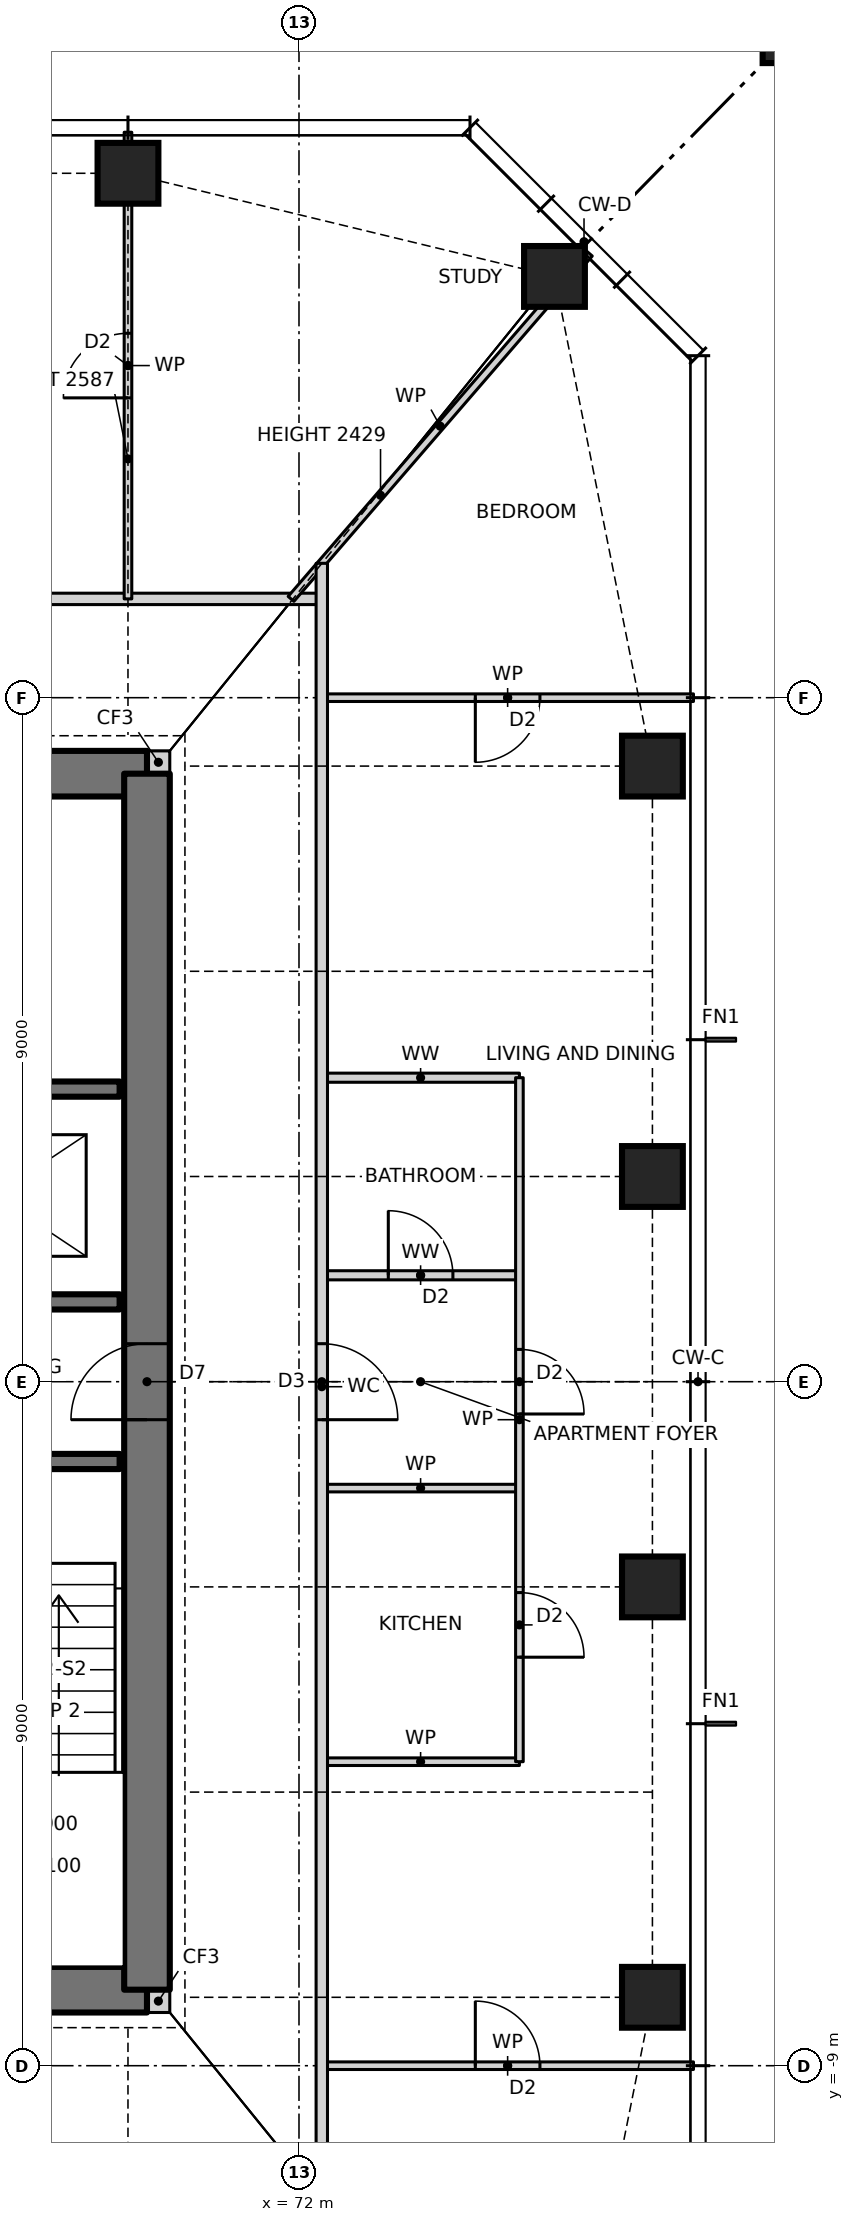
"""IFC4 building model, lengths in metres.
Left out: names, types, materials, properties, quantities, classifications, styles, units other than length and angle.
Written with IfcOpenShell. Run it as: python <this file> out.ifc"""

import sys

from ifc_helpers import new_model, si_unit, direction, frame, frame_2d, origin, origin_2d, place, context, subcontext, project, spatial, rectangle, hollow_rectangle, extrude, element, fill, save


model = new_model("IFC4")
c1 = context("Model", 3, precision=1e-05, world=origin(), true_north=direction((0.0, 1.0)))
c2 = subcontext(c1, "Body", "Model", "MODEL_VIEW")
j1 = project(units=[si_unit("LENGTHUNIT", "METRE"), si_unit("PLANEANGLEUNIT", "RADIAN")], contexts=[c1])
p1 = place(None, origin())
s1 = spatial("IfcSite", under=j1, at=p1, CompositionType="ELEMENT")
p2 = place(p1, origin())
s2 = spatial("IfcBuilding", under=s1, at=p2, CompositionType="ELEMENT")
p3 = place(p2, frame((0.0, 0.0, 122.5)))
s3 = spatial("IfcBuildingStorey", under=s2, at=p3, CompositionType="ELEMENT", Elevation=122.5)
for number, where, z_axis, x_axis in (
    (1, (76.65, -8.1, 0.0), (0.0, 0.0, 1.0), (1.0, 0.0, 0.0)),
    (2, (76.65, -2.7, 0.0), (0.0, 0.0, 1.0), (1.0, 0.0, 0.0)),
    (3, (76.65, 2.7, 0.0), (0.0, 0.0, 1.0), (1.0, 0.0, 0.0)),
    (4, (76.65, 8.1, 0.0), (0.0, 0.0, 1.0), (1.0, 0.0, 0.0)),
    (5, (75.361, 14.543, 0.0), (0.0, 0.0, 1.0), (1.0, 0.0, 0.0)),
    (6, (69.75, 15.9, 0.0), (0.0, 0.0, 1.0), (1.0, 0.0, 0.0)),
):
    element("IfcColumn", number, at=place(p3, frame(where, z_axis=z_axis, x_axis=x_axis)), inside=s3, PredefinedType="COLUMN", context=c2, shape_type="SweptSolid", body=[
        extrude(hollow_rectangle(XDim=0.8, YDim=0.8, WallThickness=0.1, at=origin_2d()), origin(), (0.0, 0.0, 1.0), 3.5),
    ])
p4 = place(p3, frame((78.65, 17.9, 0.0), z_axis=(0.0, 0.0, 1.0), x_axis=(1.0, 0.0, 0.0)))
e7 = element("IfcColumn", 7, at=p4, inside=s3, PredefinedType="COLUMN", context=c2, shape_type="SweptSolid", body=[
    extrude(hollow_rectangle(XDim=1.1, YDim=1.1, WallThickness=0.06, at=origin_2d()), origin(), (0.0, 0.0, 1.0), 3.5),
])
for number, where, z_axis, x_axis in (
    (8, (70.0, -8.15, 0.0), (0.0, 0.0, 1.0), (1.0, 0.0, 0.0)),
    (9, (70.0, 8.15, 0.0), (0.0, 0.0, 1.0), (1.0, 0.0, 0.0)),
):
    element("IfcWall", number, at=place(p3, frame(where, z_axis=z_axis, x_axis=x_axis)), inside=s3, PredefinedType="SOLIDWALL", context=c2, shape_type="SweptSolid", body=[
        extrude(rectangle(XDim=0.3, YDim=0.3, at=frame_2d((0.15, 0.0))), origin(), (0.0, 0.0, 1.0), 3.5),
    ])
p5 = place(p3, frame((56.0, -8.0, 0.0), z_axis=(0.0, 0.0, 1.0), x_axis=(1.0, 0.0, 0.0)))
e10 = element("IfcWall", 10, at=p5, inside=s3, PredefinedType="SHEAR", context=c2, shape_type="SweptSolid", body=[
    extrude(rectangle(XDim=14.0, YDim=0.6, at=frame_2d((7.0, 0.0))), origin(), (0.0, 0.0, 1.0), 3.5),
])
p6 = place(p5, frame((2.7, 0.0, 0.0)))
e11 = element("IfcOpeningElement", 11, at=p6, cuts=e10, PredefinedType="OPENING", context=c2, shape_type="SweptSolid", body=[
    extrude(rectangle(XDim=0.9, YDim=2.1, at=frame_2d((0.45, 1.05))), frame((0.0, 0.31, 0.0), z_axis=(0.0, -1.0, 0.0), x_axis=(1.0, 0.0, 0.0)), (0.0, 0.0, 1.0), 0.62),
])
p7 = place(p5, frame((7.7, 0.0, 0.0)))
e12 = element("IfcOpeningElement", 12, at=p7, cuts=e10, PredefinedType="OPENING", context=c2, shape_type="SweptSolid", body=[
    extrude(rectangle(XDim=0.9, YDim=2.1, at=frame_2d((0.45, 1.05))), frame((0.0, 0.31, 0.0), z_axis=(0.0, -1.0, 0.0), x_axis=(1.0, 0.0, 0.0)), (0.0, 0.0, 1.0), 0.62),
])
p8 = place(p3, frame((70.0, 8.0, 0.0), z_axis=(0.0, 0.0, 1.0), x_axis=(-1.0, 0.0, 0.0)))
e13 = element("IfcWall", 13, at=p8, inside=s3, PredefinedType="SHEAR", context=c2, shape_type="SweptSolid", body=[
    extrude(rectangle(XDim=14.0, YDim=0.6, at=frame_2d((7.0, 0.0))), origin(), (0.0, 0.0, 1.0), 3.5),
])
p9 = place(p8, frame((8.2, 0.0, 0.0)))
e14 = element("IfcOpeningElement", 14, at=p9, cuts=e13, PredefinedType="OPENING", context=c2, shape_type="SweptSolid", body=[
    extrude(rectangle(XDim=0.9, YDim=2.1, at=frame_2d((0.45, 1.05))), frame((0.0, 0.31, 0.0), z_axis=(0.0, -1.0, 0.0), x_axis=(1.0, 0.0, 0.0)), (0.0, 0.0, 1.0), 0.62),
])
p10 = place(p8, frame((3.2, 0.0, 0.0)))
e15 = element("IfcOpeningElement", 15, at=p10, cuts=e13, PredefinedType="OPENING", context=c2, shape_type="SweptSolid", body=[
    extrude(rectangle(XDim=0.9, YDim=2.1, at=frame_2d((0.45, 1.05))), frame((0.0, 0.31, 0.0), z_axis=(0.0, -1.0, 0.0), x_axis=(1.0, 0.0, 0.0)), (0.0, 0.0, 1.0), 0.62),
])
p11 = place(p3, frame((70.0, -8.0, 0.0), z_axis=(0.0, 0.0, 1.0), x_axis=(0.0, 1.0, 0.0)))
e16 = element("IfcWall", 16, at=p11, inside=s3, PredefinedType="SHEAR", context=c2, shape_type="SweptSolid", body=[
    extrude(rectangle(XDim=16.0, YDim=0.6, at=frame_2d((8.0, 0.0))), origin(), (0.0, 0.0, 1.0), 3.5),
])
p12 = place(p11, frame((7.5, 0.0, 0.0)))
e17 = element("IfcOpeningElement", 17, at=p12, cuts=e16, PredefinedType="OPENING", context=c2, shape_type="SweptSolid", body=[
    extrude(rectangle(XDim=1.0, YDim=2.1, at=frame_2d((0.5, 1.05))), frame((0.0, 0.31, 0.0), z_axis=(0.0, -1.0, 0.0), x_axis=(1.0, 0.0, 0.0)), (0.0, 0.0, 1.0), 0.62),
])
p13 = place(p3, frame((72.3, -9.0, 0.0), z_axis=(0.0, 0.0, 1.0), x_axis=(1.0, 0.0, 0.0)))
e18 = element("IfcWall", 18, at=p13, inside=s3, PredefinedType="PARTITIONING", context=c2, shape_type="SweptSolid", body=[
    extrude(rectangle(XDim=4.89, YDim=0.1, at=frame_2d((2.445, 0.0))), origin(), (0.0, 0.0, 1.0), 3.27),
])
p14 = place(p13, frame((2.02, 0.0, 0.0)))
e19 = element("IfcOpeningElement", 19, at=p14, cuts=e18, PredefinedType="OPENING", context=c2, shape_type="SweptSolid", body=[
    extrude(rectangle(XDim=0.85, YDim=2.1, at=frame_2d((0.425, 1.05))), frame((0.0, 0.06, 0.0), z_axis=(0.0, -1.0, 0.0), x_axis=(1.0, 0.0, 0.0)), (0.0, 0.0, 1.0), 0.12),
])
for number, where, z_axis, x_axis in (
    (20, (72.3, -5.0, 0.0), (0.0, 0.0, 1.0), (1.0, 0.0, 0.0)),
    (21, (72.3, -1.4, 0.0), (0.0, 0.0, 1.0), (1.0, 0.0, 0.0)),
):
    element("IfcWall", number, at=place(p3, frame(where, z_axis=z_axis, x_axis=x_axis)), inside=s3, PredefinedType="PARTITIONING", context=c2, shape_type="SweptSolid", body=[
        extrude(rectangle(XDim=2.6, YDim=0.1, at=frame_2d((1.3, 0.0))), origin(), (0.0, 0.0, 1.0), 3.27),
    ])
p15 = place(p3, frame((56.36, -1.05, 0.0), z_axis=(0.0, 0.0, 1.0), x_axis=(1.0, 0.0, 0.0)))
e22 = element("IfcWall", 22, at=p15, inside=s3, PredefinedType="SOLIDWALL", context=c2, shape_type="SweptSolid", body=[
    extrude(rectangle(XDim=13.28, YDim=0.2, at=frame_2d((6.64, 0.0))), origin(), (0.0, 0.0, 1.0), 3.5),
])
p16 = place(p15, frame((11.11, 0.0, 0.0)))
e23 = element("IfcOpeningElement", 23, at=p16, cuts=e22, PredefinedType="OPENING", context=c2, shape_type="SweptSolid", body=[
    extrude(rectangle(XDim=1.0, YDim=2.1, at=frame_2d((0.5, 1.05))), frame((0.0, 0.11, 0.0), z_axis=(0.0, -1.0, 0.0), x_axis=(1.0, 0.0, 0.0)), (0.0, 0.0, 1.0), 0.22),
])
p17 = place(p15, frame((1.087, 0.0, 0.0)))
e24 = element("IfcOpeningElement", 24, at=p17, cuts=e22, PredefinedType="OPENING", context=c2, shape_type="SweptSolid", body=[
    extrude(rectangle(XDim=1.1, YDim=2.1, at=frame_2d((0.55, 1.05))), frame((0.0, 0.11, 0.0), z_axis=(0.0, -1.0, 0.0), x_axis=(1.0, 0.0, 0.0)), (0.0, 0.0, 1.0), 0.22),
])
p18 = place(p15, frame((4.39, 0.0, 0.0)))
e25 = element("IfcOpeningElement", 25, at=p18, cuts=e22, PredefinedType="OPENING", context=c2, shape_type="SweptSolid", body=[
    extrude(rectangle(XDim=1.1, YDim=2.1, at=frame_2d((0.55, 1.05))), frame((0.0, 0.11, 0.0), z_axis=(0.0, -1.0, 0.0), x_axis=(1.0, 0.0, 0.0)), (0.0, 0.0, 1.0), 0.22),
])
p19 = place(p15, frame((7.724, 0.0, 0.0)))
e26 = element("IfcOpeningElement", 26, at=p19, cuts=e22, PredefinedType="OPENING", context=c2, shape_type="SweptSolid", body=[
    extrude(rectangle(XDim=1.1, YDim=2.1, at=frame_2d((0.55, 1.05))), frame((0.0, 0.11, 0.0), z_axis=(0.0, -1.0, 0.0), x_axis=(1.0, 0.0, 0.0)), (0.0, 0.0, 1.0), 0.22),
])
p20 = place(p3, frame((56.36, 1.05, 0.0), z_axis=(0.0, 0.0, 1.0), x_axis=(1.0, 0.0, 0.0)))
e27 = element("IfcWall", 27, at=p20, inside=s3, PredefinedType="SOLIDWALL", context=c2, shape_type="SweptSolid", body=[
    extrude(rectangle(XDim=13.28, YDim=0.2, at=frame_2d((6.64, 0.0))), origin(), (0.0, 0.0, 1.0), 3.5),
])
p21 = place(p20, frame((1.17, 0.0, 0.0)))
e28 = element("IfcOpeningElement", 28, at=p21, cuts=e27, PredefinedType="OPENING", context=c2, shape_type="SweptSolid", body=[
    extrude(rectangle(XDim=1.0, YDim=2.1, at=frame_2d((0.5, 1.05))), frame((0.0, 0.11, 0.0), z_axis=(0.0, -1.0, 0.0), x_axis=(1.0, 0.0, 0.0)), (0.0, 0.0, 1.0), 0.22),
])
p22 = place(p20, frame((5.14, 0.0, 0.0)))
e29 = element("IfcOpeningElement", 29, at=p22, cuts=e27, PredefinedType="OPENING", context=c2, shape_type="SweptSolid", body=[
    extrude(rectangle(XDim=0.9, YDim=2.1, at=frame_2d((0.45, 1.05))), frame((0.0, 0.11, 0.0), z_axis=(0.0, -1.0, 0.0), x_axis=(1.0, 0.0, 0.0)), (0.0, 0.0, 1.0), 0.22),
])
p23 = place(p20, frame((8.44, 0.0, 0.0)))
e30 = element("IfcOpeningElement", 30, at=p23, cuts=e27, PredefinedType="OPENING", context=c2, shape_type="SweptSolid", body=[
    extrude(rectangle(XDim=0.9, YDim=2.1, at=frame_2d((0.45, 1.05))), frame((0.0, 0.11, 0.0), z_axis=(0.0, -1.0, 0.0), x_axis=(1.0, 0.0, 0.0)), (0.0, 0.0, 1.0), 0.22),
])
p24 = place(p20, frame((10.96, 0.0, 0.0)))
e31 = element("IfcOpeningElement", 31, at=p24, cuts=e27, PredefinedType="OPENING", context=c2, shape_type="SweptSolid", body=[
    extrude(rectangle(XDim=1.3, YDim=2.1, at=frame_2d((0.65, 1.05))), frame((0.0, 0.11, 0.0), z_axis=(0.0, -1.0, 0.0), x_axis=(1.0, 0.0, 0.0)), (0.0, 0.0, 1.0), 0.22),
])
p25 = place(p3, frame((72.3, 1.4, 0.0), z_axis=(0.0, 0.0, 1.0), x_axis=(1.0, 0.0, 0.0)))
e32 = element("IfcWall", 32, at=p25, inside=s3, PredefinedType="PARTITIONING", context=c2, shape_type="SweptSolid", body=[
    extrude(rectangle(XDim=2.6, YDim=0.12, at=frame_2d((1.3, 0.0))), origin(), (0.0, 0.0, 1.0), 3.27),
])
p26 = place(p25, frame((0.875, 0.0, 0.0)))
e33 = element("IfcOpeningElement", 33, at=p26, cuts=e32, PredefinedType="OPENING", context=c2, shape_type="SweptSolid", body=[
    extrude(rectangle(XDim=0.85, YDim=2.1, at=frame_2d((0.425, 1.05))), frame((0.0, 0.07, 0.0), z_axis=(0.0, -1.0, 0.0), x_axis=(1.0, 0.0, 0.0)), (0.0, 0.0, 1.0), 0.14),
])
p27 = place(p3, frame((59.7, 3.85, 0.0), z_axis=(0.0, 0.0, 1.0), x_axis=(1.0, 0.0, 0.0)))
e34 = element("IfcWall", 34, at=p27, inside=s3, PredefinedType="SOLIDWALL", context=c2, shape_type="SweptSolid", body=[
    extrude(rectangle(XDim=9.94, YDim=0.2, at=frame_2d((4.97, 0.0))), origin(), (0.0, 0.0, 1.0), 3.5),
])
p28 = place(p3, frame((72.3, 4.0, 0.0), z_axis=(0.0, 0.0, 1.0), x_axis=(1.0, 0.0, 0.0)))
e35 = element("IfcWall", 35, at=p28, inside=s3, PredefinedType="PARTITIONING", context=c2, shape_type="SweptSolid", body=[
    extrude(rectangle(XDim=2.6, YDim=0.12, at=frame_2d((1.3, 0.0))), origin(), (0.0, 0.0, 1.0), 3.27),
])
p29 = place(p3, frame((72.3, 9.0, 0.0), z_axis=(0.0, 0.0, 1.0), x_axis=(1.0, 0.0, 0.0)))
e36 = element("IfcWall", 36, at=p29, inside=s3, PredefinedType="PARTITIONING", context=c2, shape_type="SweptSolid", body=[
    extrude(rectangle(XDim=4.89, YDim=0.1, at=frame_2d((2.445, 0.0))), origin(), (0.0, 0.0, 1.0), 3.27),
])
p30 = place(p29, frame((2.02, 0.0, 0.0)))
e37 = element("IfcOpeningElement", 37, at=p30, cuts=e36, PredefinedType="OPENING", context=c2, shape_type="SweptSolid", body=[
    extrude(rectangle(XDim=0.85, YDim=2.1, at=frame_2d((0.425, 1.05))), frame((0.0, 0.06, 0.0), z_axis=(0.0, -1.0, 0.0), x_axis=(1.0, 0.0, 0.0)), (0.0, 0.0, 1.0), 0.12),
])
p31 = place(p3, frame((53.7, 10.3, 0.0), z_axis=(0.0, 0.0, 1.0), x_axis=(1.0, 0.0, 0.0)))
e38 = element("IfcWall", 38, at=p31, inside=s3, PredefinedType="PARTITIONING", context=c2, shape_type="SweptSolid", body=[
    extrude(rectangle(XDim=18.6, YDim=0.15, at=frame_2d((9.3, 0.0))), origin(), (0.0, 0.0, 1.0), 3.27),
])
p32 = place(p31, frame((8.8, 0.0, 0.0)))
e39 = element("IfcOpeningElement", 39, at=p32, cuts=e38, PredefinedType="OPENING", context=c2, shape_type="SweptSolid", body=[
    extrude(rectangle(XDim=1.0, YDim=2.1, at=frame_2d((0.5, 1.05))), frame((0.0, 0.085, 0.0), z_axis=(0.0, -1.0, 0.0), x_axis=(1.0, 0.0, 0.0)), (0.0, 0.0, 1.0), 0.17),
])
p33 = place(p3, frame((71.895, 10.3, 0.0), z_axis=(0.0, 0.0, 1.0), x_axis=(0.65378286253, 0.756682211144, 0.0)))
e40 = element("IfcWall", 40, at=p33, inside=s3, PredefinedType="PARTITIONING", context=c2, shape_type="SweptSolid", body=[
    extrude(rectangle(XDim=6.005, YDim=0.1, at=frame_2d((3.002, 0.0))), origin(), (0.0, 0.0, 1.0), 2.429),
])
p34 = place(p3, frame((74.9, -5.0, 0.0), z_axis=(0.0, 0.0, 1.0), x_axis=(0.0, 1.0, 0.0)))
e41 = element("IfcWall", 41, at=p34, inside=s3, PredefinedType="PARTITIONING", context=c2, shape_type="SweptSolid", body=[
    extrude(rectangle(XDim=9.0, YDim=0.1, at=frame_2d((4.5, 0.0))), origin(), (0.0, 0.0, 1.0), 3.27),
])
p35 = place(p34, frame((1.375, 0.0, 0.0)))
e42 = element("IfcOpeningElement", 42, at=p35, cuts=e41, PredefinedType="OPENING", context=c2, shape_type="SweptSolid", body=[
    extrude(rectangle(XDim=0.85, YDim=2.1, at=frame_2d((0.425, 1.05))), frame((0.0, 0.06, 0.0), z_axis=(0.0, -1.0, 0.0), x_axis=(1.0, 0.0, 0.0)), (0.0, 0.0, 1.0), 0.12),
])
p36 = place(p34, frame((4.575, 0.0, 0.0)))
e43 = element("IfcOpeningElement", 43, at=p36, cuts=e41, PredefinedType="OPENING", context=c2, shape_type="SweptSolid", body=[
    extrude(rectangle(XDim=0.85, YDim=2.1, at=frame_2d((0.425, 1.05))), frame((0.0, 0.06, 0.0), z_axis=(0.0, -1.0, 0.0), x_axis=(1.0, 0.0, 0.0)), (0.0, 0.0, 1.0), 0.12),
])
p37 = place(p3, frame((72.3, -10.9, 0.0), z_axis=(0.0, 0.0, 1.0), x_axis=(0.0, 1.0, 0.0)))
e44 = element("IfcWall", 44, at=p37, inside=s3, PredefinedType="PARTITIONING", context=c2, shape_type="SweptSolid", body=[
    extrude(rectangle(XDim=21.668, YDim=0.15, at=frame_2d((10.834, 0.0))), origin(), (0.0, 0.0, 1.0), 3.27),
])
p38 = place(p37, frame((10.4, 0.0, 0.0)))
e45 = element("IfcOpeningElement", 45, at=p38, cuts=e44, PredefinedType="OPENING", context=c2, shape_type="SweptSolid", body=[
    extrude(rectangle(XDim=1.0, YDim=2.1, at=frame_2d((0.5, 1.05))), frame((0.0, 0.085, 0.0), z_axis=(0.0, -1.0, 0.0), x_axis=(1.0, 0.0, 0.0)), (0.0, 0.0, 1.0), 0.17),
])
p39 = place(p3, frame((69.75, 10.3, 0.0), z_axis=(0.0, 0.0, 1.0), x_axis=(0.0, 1.0, 0.0)))
e46 = element("IfcWall", 46, at=p39, inside=s3, PredefinedType="PARTITIONING", context=c2, shape_type="SweptSolid", body=[
    extrude(rectangle(XDim=6.14, YDim=0.1, at=frame_2d((3.07, 0.0))), origin(), (0.0, 0.0, 1.0), 2.587),
])
p40 = place(p39, frame((2.645, 0.0, 0.0)))
e47 = element("IfcOpeningElement", 47, at=p40, cuts=e46, PredefinedType="OPENING", context=c2, shape_type="SweptSolid", body=[
    extrude(rectangle(XDim=0.85, YDim=2.1, at=frame_2d((0.425, 1.05))), frame((0.0, 0.06, 0.0), z_axis=(0.0, -1.0, 0.0), x_axis=(1.0, 0.0, 0.0)), (0.0, 0.0, 1.0), 0.12),
])
p41 = place(p35, frame((0.85, 0.0, 0.0), z_axis=(0.0, 0.0, 1.0), x_axis=(-1.0, 0.0, 0.0)))
e48 = element("IfcDoor", 48, at=p41, inside=s3, OperationType="SINGLE_SWING_RIGHT", PredefinedType="DOOR", context=c2, shape_type="SweptSolid", body=[
    extrude(rectangle(XDim=0.85, YDim=2.1, at=frame_2d((0.425, 1.05))), frame((0.0, 0.025, 0.0), z_axis=(0.0, -1.0, 0.0), x_axis=(1.0, 0.0, 0.0)), (0.0, 0.0, 1.0), 0.05),
])
fill(e42, e48)
p42 = place(p38, frame((1.0, 0.0, 0.0), z_axis=(0.0, 0.0, 1.0), x_axis=(-1.0, 0.0, 0.0)))
e49 = element("IfcDoor", 49, at=p42, inside=s3, OperationType="SINGLE_SWING_RIGHT", PredefinedType="DOOR", context=c2, shape_type="SweptSolid", body=[
    extrude(rectangle(XDim=1.0, YDim=2.1, at=frame_2d((0.5, 1.05))), frame((0.0, 0.025, 0.0), z_axis=(0.0, -1.0, 0.0), x_axis=(1.0, 0.0, 0.0)), (0.0, 0.0, 1.0), 0.05),
])
fill(e45, e49)
p43 = place(p36, frame((0.85, 0.0, 0.0), z_axis=(0.0, 0.0, 1.0), x_axis=(-1.0, 0.0, 0.0)))
e50 = element("IfcDoor", 50, at=p43, inside=s3, OperationType="SINGLE_SWING_RIGHT", PredefinedType="DOOR", context=c2, shape_type="SweptSolid", body=[
    extrude(rectangle(XDim=0.85, YDim=2.1, at=frame_2d((0.425, 1.05))), frame((0.0, 0.025, 0.0), z_axis=(0.0, -1.0, 0.0), x_axis=(1.0, 0.0, 0.0)), (0.0, 0.0, 1.0), 0.05),
])
fill(e43, e50)
p44 = place(p26, origin())
e51 = element("IfcDoor", 51, at=p44, inside=s3, OperationType="SINGLE_SWING_LEFT", PredefinedType="DOOR", context=c2, shape_type="SweptSolid", body=[
    extrude(rectangle(XDim=0.85, YDim=2.1, at=frame_2d((0.425, 1.05))), frame((0.0, 0.025, 0.0), z_axis=(0.0, -1.0, 0.0), x_axis=(1.0, 0.0, 0.0)), (0.0, 0.0, 1.0), 0.05),
])
fill(e33, e51)
p45 = place(p14, origin())
e52 = element("IfcDoor", 52, at=p45, inside=s3, OperationType="SINGLE_SWING_LEFT", PredefinedType="DOOR", context=c2, shape_type="SweptSolid", body=[
    extrude(rectangle(XDim=0.85, YDim=2.1, at=frame_2d((0.425, 1.05))), frame((0.0, 0.025, 0.0), z_axis=(0.0, -1.0, 0.0), x_axis=(1.0, 0.0, 0.0)), (0.0, 0.0, 1.0), 0.05),
])
fill(e19, e52)
p46 = place(p30, frame((0.85, 0.0, 0.0), z_axis=(0.0, 0.0, 1.0), x_axis=(-1.0, 0.0, 0.0)))
e53 = element("IfcDoor", 53, at=p46, inside=s3, OperationType="SINGLE_SWING_RIGHT", PredefinedType="DOOR", context=c2, shape_type="SweptSolid", body=[
    extrude(rectangle(XDim=0.85, YDim=2.1, at=frame_2d((0.425, 1.05))), frame((0.0, 0.025, 0.0), z_axis=(0.0, -1.0, 0.0), x_axis=(1.0, 0.0, 0.0)), (0.0, 0.0, 1.0), 0.05),
])
fill(e37, e53)
p47 = place(p40, origin())
e54 = element("IfcDoor", 54, at=p47, inside=s3, OperationType="SINGLE_SWING_LEFT", PredefinedType="DOOR", context=c2, shape_type="SweptSolid", body=[
    extrude(rectangle(XDim=0.85, YDim=2.1, at=frame_2d((0.425, 1.05))), frame((0.0, 0.025, 0.0), z_axis=(0.0, -1.0, 0.0), x_axis=(1.0, 0.0, 0.0)), (0.0, 0.0, 1.0), 0.05),
])
fill(e47, e54)
p48 = place(p12, origin())
e55 = element("IfcDoor", 55, at=p48, inside=s3, OperationType="SINGLE_SWING_LEFT", PredefinedType="DOOR", context=c2, shape_type="SweptSolid", body=[
    extrude(rectangle(XDim=1.0, YDim=2.1, at=frame_2d((0.5, 1.05))), frame((0.0, 0.025, 0.0), z_axis=(0.0, -1.0, 0.0), x_axis=(1.0, 0.0, 0.0)), (0.0, 0.0, 1.0), 0.05),
])
fill(e17, e55)
save(model, sys.argv[1])
